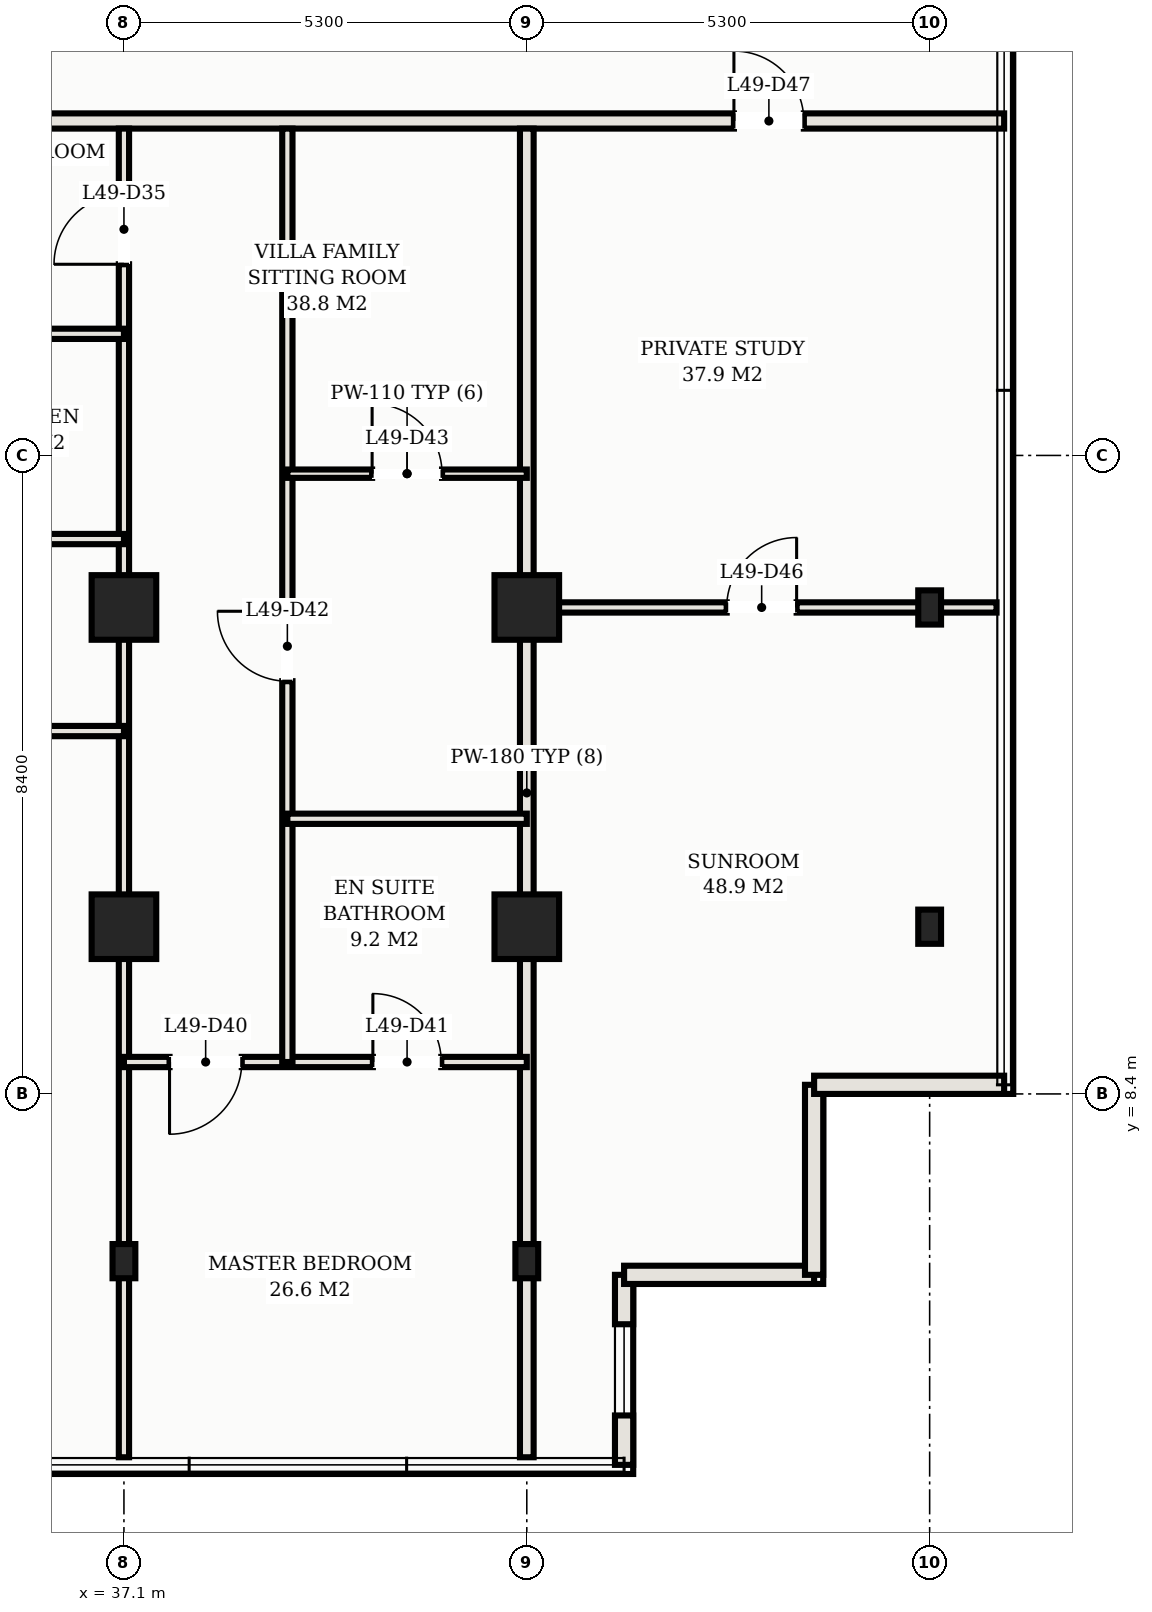
"""IFC4 building model, lengths in metres.
Left out: names, types, materials, properties, quantities, classifications, styles, units other than length and angle.
Written with IfcOpenShell. Run it as: python <this file> out.ifc"""

import sys

from ifc_helpers import new_model, si_unit, direction, frame, frame_2d, origin, origin_2d, place, context, subcontext, project, spatial, rectangle, hollow_rectangle, extrude, element, fill, save


model = new_model("IFC4")
c1 = context("Model", 3, precision=1e-05, world=origin(), true_north=direction((0.0, 1.0)))
c2 = subcontext(c1, "Body", "Model", "MODEL_VIEW")
j1 = project(units=[si_unit("LENGTHUNIT", "METRE"), si_unit("PLANEANGLEUNIT", "RADIAN")], contexts=[c1])
p1 = place(None, origin())
s1 = spatial("IfcSite", under=j1, at=p1, CompositionType="ELEMENT")
p2 = place(p1, origin())
s2 = spatial("IfcBuilding", under=s1, at=p2, CompositionType="ELEMENT")
p3 = place(p2, frame((0.0, 0.0, 178.8)))
s3 = spatial("IfcBuildingStorey", under=s2, at=p3, CompositionType="ELEMENT", Elevation=178.8)
for number, where, z_axis, x_axis in (
    (1, (37.1, 14.8, 0.0), (0.0, 0.0, 1.0), (1.0, 0.0, 0.0)),
    (2, (37.1, 10.6, 0.0), (0.0, 0.0, 1.0), (1.0, 0.0, 0.0)),
    (3, (42.4, 14.8, 0.0), (0.0, 0.0, 1.0), (1.0, 0.0, 0.0)),
    (4, (42.4, 10.6, 0.0), (0.0, 0.0, 1.0), (1.0, 0.0, 0.0)),
):
    element("IfcColumn", number, at=place(p3, frame(where, z_axis=z_axis, x_axis=x_axis)), inside=s3, PredefinedType="COLUMN", context=c2, shape_type="SweptSolid", body=[
        extrude(hollow_rectangle(XDim=0.85, YDim=0.85, WallThickness=0.028, at=origin_2d()), origin(), (0.0, 0.0, 1.0), 3.3),
    ])
for number, where, z_axis, x_axis in (
    (5, (37.1, 6.2, 0.0), (0.0, 0.0, 1.0), (1.0, 0.0, 0.0)),
    (6, (42.4, 6.2, 0.0), (0.0, 0.0, 1.0), (1.0, 0.0, 0.0)),
    (7, (47.7, 10.6, 0.0), (0.0, 0.0, 1.0), (1.0, 0.0, 0.0)),
    (8, (47.7, 14.8, 0.0), (0.0, 0.0, 1.0), (1.0, 0.0, 0.0)),
):
    element("IfcColumn", number, at=place(p3, frame(where, z_axis=z_axis, x_axis=x_axis)), inside=s3, PredefinedType="COLUMN", context=c2, shape_type="SweptSolid", body=[
        extrude(hollow_rectangle(XDim=0.3, YDim=0.45, WallThickness=0.016, at=origin_2d()), origin(), (0.0, 0.0, 1.0), 3.3),
    ])
p4 = place(p3, frame((43.68, 3.52, 0.0), z_axis=(0.0, 0.0, 1.0), x_axis=(0.0, 1.0, 0.0)))
e9 = element("IfcWall", 9, at=p4, inside=s3, PredefinedType="SOLIDWALL", context=c2, shape_type="SweptSolid", body=[
    extrude(rectangle(XDim=2.5, YDim=0.24, at=frame_2d((1.25, 0.0))), origin(), (0.0, 0.0, 1.0), 3.1),
])
p5 = place(p4, frame((0.65, 0.0, 0.75)))
e10 = element("IfcOpeningElement", 10, at=p5, cuts=e9, PredefinedType="OPENING", context=c2, shape_type="SweptSolid", body=[
    extrude(rectangle(XDim=1.2, YDim=1.5, at=frame_2d((0.6, 0.75))), frame((0.0, 0.13, 0.0), z_axis=(0.0, -1.0, 0.0), x_axis=(1.0, 0.0, 0.0)), (0.0, 0.0, 1.0), 0.26),
])
for number, where, z_axis, x_axis in (
    (11, (43.68, 6.02, 0.0), (0.0, 0.0, 1.0), (1.0, 0.0, 0.0)),
    (12, (46.18, 6.02, 0.0), (0.0, 0.0, 1.0), (0.0, 1.0, 0.0)),
    (13, (46.18, 8.52, 0.0), (0.0, 0.0, 1.0), (1.0, 0.0, 0.0)),
):
    element("IfcWall", number, at=place(p3, frame(where, z_axis=z_axis, x_axis=x_axis)), inside=s3, PredefinedType="SOLIDWALL", context=c2, shape_type="SweptSolid", body=[
        extrude(rectangle(XDim=2.5, YDim=0.24, at=frame_2d((1.25, 0.0))), origin(), (0.0, 0.0, 1.0), 3.1),
    ])
p6 = place(p3, frame((4.32, 21.2, 0.0), z_axis=(0.0, 0.0, 1.0), x_axis=(1.0, 0.0, 0.0)))
e14 = element("IfcWall", 14, at=p6, inside=s3, PredefinedType="PARTITIONING", context=c2, shape_type="SweptSolid", body=[
    extrude(rectangle(XDim=44.36, YDim=0.2, at=frame_2d((22.18, 0.0))), origin(), (0.0, 0.0, 1.0), 2.38),
])
p7 = place(p6, frame((7.03, 0.0, 0.0)))
e15 = element("IfcOpeningElement", 15, at=p7, cuts=e14, PredefinedType="OPENING", context=c2, shape_type="SweptSolid", body=[
    extrude(rectangle(XDim=1.1, YDim=2.25, at=frame_2d((0.55, 1.125))), frame((0.0, 0.11, 0.0), z_axis=(0.0, -1.0, 0.0), x_axis=(1.0, 0.0, 0.0)), (0.0, 0.0, 1.0), 0.22),
])
p8 = place(p6, frame((28.23, 0.0, 0.0)))
e16 = element("IfcOpeningElement", 16, at=p8, cuts=e14, PredefinedType="OPENING", context=c2, shape_type="SweptSolid", body=[
    extrude(rectangle(XDim=1.1, YDim=2.25, at=frame_2d((0.55, 1.125))), frame((0.0, 0.11, 0.0), z_axis=(0.0, -1.0, 0.0), x_axis=(1.0, 0.0, 0.0)), (0.0, 0.0, 1.0), 0.22),
])
p9 = place(p6, frame((2.635, 0.0, 0.0)))
e17 = element("IfcOpeningElement", 17, at=p9, cuts=e14, PredefinedType="OPENING", context=c2, shape_type="SweptSolid", body=[
    extrude(rectangle(XDim=0.92, YDim=2.15, at=frame_2d((0.46, 1.075))), frame((0.0, 0.11, 0.0), z_axis=(0.0, -1.0, 0.0), x_axis=(1.0, 0.0, 0.0)), (0.0, 0.0, 1.0), 0.22),
])
p10 = place(p6, frame((40.805, 0.0, 0.0)))
e18 = element("IfcOpeningElement", 18, at=p10, cuts=e14, PredefinedType="OPENING", context=c2, shape_type="SweptSolid", body=[
    extrude(rectangle(XDim=0.92, YDim=2.15, at=frame_2d((0.46, 1.075))), frame((0.0, 0.11, 0.0), z_axis=(0.0, -1.0, 0.0), x_axis=(1.0, 0.0, 0.0)), (0.0, 0.0, 1.0), 0.22),
])
p11 = place(p3, frame((42.4, 3.62, 0.0), z_axis=(0.0, 0.0, 1.0), x_axis=(0.0, 1.0, 0.0)))
e19 = element("IfcWall", 19, at=p11, inside=s3, PredefinedType="PARTITIONING", context=c2, shape_type="SweptSolid", body=[
    extrude(rectangle(XDim=17.48, YDim=0.18, at=frame_2d((8.74, 0.0))), origin(), (0.0, 0.0, 1.0), 2.38),
])
p12 = place(p3, frame((37.1, 3.62, 0.0), z_axis=(0.0, 0.0, 1.0), x_axis=(0.0, 1.0, 0.0)))
e20 = element("IfcWall", 20, at=p12, inside=s3, PredefinedType="PARTITIONING", context=c2, shape_type="SweptSolid", body=[
    extrude(rectangle(XDim=17.48, YDim=0.135, at=frame_2d((8.74, 0.0))), origin(), (0.0, 0.0, 1.0), 2.38),
])
p13 = place(p12, frame((15.695, 0.0, 0.0)))
e21 = element("IfcOpeningElement", 21, at=p13, cuts=e20, PredefinedType="OPENING", context=c2, shape_type="SweptSolid", body=[
    extrude(rectangle(XDim=0.92, YDim=2.15, at=frame_2d((0.46, 1.075))), frame((0.0, 0.078, 0.0), z_axis=(0.0, -1.0, 0.0), x_axis=(1.0, 0.0, 0.0)), (0.0, 0.0, 1.0), 0.155),
])
p14 = place(p3, frame((31.8, 13.174, 0.0), z_axis=(0.0, 0.0, 1.0), x_axis=(1.0, 0.0, 0.0)))
e22 = element("IfcWall", 22, at=p14, inside=s3, PredefinedType="PARTITIONING", context=c2, shape_type="SweptSolid", body=[
    extrude(rectangle(XDim=5.3, YDim=0.135, at=frame_2d((2.65, 0.0))), origin(), (0.0, 0.0, 1.0), 2.38),
])
p15 = place(p14, frame((0.615, 0.0, 0.0)))
e23 = element("IfcOpeningElement", 23, at=p15, cuts=e22, PredefinedType="OPENING", context=c2, shape_type="SweptSolid", body=[
    extrude(rectangle(XDim=0.92, YDim=2.15, at=frame_2d((0.46, 1.075))), frame((0.0, 0.078, 0.0), z_axis=(0.0, -1.0, 0.0), x_axis=(1.0, 0.0, 0.0)), (0.0, 0.0, 1.0), 0.155),
])
for number, where, z_axis, x_axis in (
    (24, (33.95, 15.7, 0.0), (0.0, 0.0, 1.0), (1.0, 0.0, 0.0)),
    (25, (33.95, 18.4, 0.0), (0.0, 0.0, 1.0), (1.0, 0.0, 0.0)),
):
    element("IfcWall", number, at=place(p3, frame(where, z_axis=z_axis, x_axis=x_axis)), inside=s3, PredefinedType="PARTITIONING", context=c2, shape_type="SweptSolid", body=[
        extrude(rectangle(XDim=3.15, YDim=0.135, at=frame_2d((1.575, 0.0))), origin(), (0.0, 0.0, 1.0), 2.38),
    ])
p16 = place(p3, frame((37.1, 8.82, 0.0), z_axis=(0.0, 0.0, 1.0), x_axis=(1.0, 0.0, 0.0)))
e26 = element("IfcWall", 26, at=p16, inside=s3, PredefinedType="PARTITIONING", context=c2, shape_type="SweptSolid", body=[
    extrude(rectangle(XDim=5.3, YDim=0.135, at=frame_2d((2.65, 0.0))), origin(), (0.0, 0.0, 1.0), 2.38),
])
p17 = place(p16, frame((0.6, 0.0, 0.0)))
e27 = element("IfcOpeningElement", 27, at=p17, cuts=e26, PredefinedType="OPENING", context=c2, shape_type="SweptSolid", body=[
    extrude(rectangle(XDim=0.95, YDim=2.15, at=frame_2d((0.475, 1.075))), frame((0.0, 0.078, 0.0), z_axis=(0.0, -1.0, 0.0), x_axis=(1.0, 0.0, 0.0)), (0.0, 0.0, 1.0), 0.155),
])
p18 = place(p16, frame((3.275, 0.0, 0.0)))
e28 = element("IfcOpeningElement", 28, at=p18, cuts=e26, PredefinedType="OPENING", context=c2, shape_type="SweptSolid", body=[
    extrude(rectangle(XDim=0.9, YDim=2.15, at=frame_2d((0.45, 1.075))), frame((0.0, 0.078, 0.0), z_axis=(0.0, -1.0, 0.0), x_axis=(1.0, 0.0, 0.0)), (0.0, 0.0, 1.0), 0.155),
])
p19 = place(p3, frame((39.25, 8.82, 0.0), z_axis=(0.0, 0.0, 1.0), x_axis=(0.0, 1.0, 0.0)))
e29 = element("IfcWall", 29, at=p19, inside=s3, PredefinedType="PARTITIONING", context=c2, shape_type="SweptSolid", body=[
    extrude(rectangle(XDim=12.28, YDim=0.135, at=frame_2d((6.14, 0.0))), origin(), (0.0, 0.0, 1.0), 2.38),
])
p20 = place(p19, frame((5.01, 0.0, 0.0)))
e30 = element("IfcOpeningElement", 30, at=p20, cuts=e29, PredefinedType="OPENING", context=c2, shape_type="SweptSolid", body=[
    extrude(rectangle(XDim=0.92, YDim=2.15, at=frame_2d((0.46, 1.075))), frame((0.0, 0.078, 0.0), z_axis=(0.0, -1.0, 0.0), x_axis=(1.0, 0.0, 0.0)), (0.0, 0.0, 1.0), 0.155),
])
p21 = place(p3, frame((39.25, 12.02, 0.0), z_axis=(0.0, 0.0, 1.0), x_axis=(1.0, 0.0, 0.0)))
e31 = element("IfcWall", 31, at=p21, inside=s3, PredefinedType="PARTITIONING", context=c2, shape_type="SweptSolid", body=[
    extrude(rectangle(XDim=3.15, YDim=0.135, at=frame_2d((1.575, 0.0))), origin(), (0.0, 0.0, 1.0), 2.38),
])
p22 = place(p3, frame((39.25, 16.56, 0.0), z_axis=(0.0, 0.0, 1.0), x_axis=(1.0, 0.0, 0.0)))
e32 = element("IfcWall", 32, at=p22, inside=s3, PredefinedType="MOVABLE", context=c2, shape_type="SweptSolid", body=[
    extrude(rectangle(XDim=3.15, YDim=0.11, at=frame_2d((1.575, 0.0))), origin(), (0.0, 0.0, 1.0), 2.38),
])
p23 = place(p22, frame((1.115, 0.0, 0.0)))
e33 = element("IfcOpeningElement", 33, at=p23, cuts=e32, PredefinedType="OPENING", context=c2, shape_type="SweptSolid", body=[
    extrude(rectangle(XDim=0.92, YDim=2.15, at=frame_2d((0.46, 1.075))), frame((0.0, 0.065, 0.0), z_axis=(0.0, -1.0, 0.0), x_axis=(1.0, 0.0, 0.0)), (0.0, 0.0, 1.0), 0.13),
])
p24 = place(p3, frame((42.4, 14.8, 0.0), z_axis=(0.0, 0.0, 1.0), x_axis=(1.0, 0.0, 0.0)))
e34 = element("IfcWall", 34, at=p24, inside=s3, PredefinedType="PARTITIONING", context=c2, shape_type="SweptSolid", body=[
    extrude(rectangle(XDim=6.18, YDim=0.135, at=frame_2d((3.09, 0.0))), origin(), (0.0, 0.0, 1.0), 2.38),
])
p25 = place(p24, frame((2.63, 0.0, 0.0)))
e35 = element("IfcOpeningElement", 35, at=p25, cuts=e34, PredefinedType="OPENING", context=c2, shape_type="SweptSolid", body=[
    extrude(rectangle(XDim=0.92, YDim=2.15, at=frame_2d((0.46, 1.075))), frame((0.0, 0.078, 0.0), z_axis=(0.0, -1.0, 0.0), x_axis=(1.0, 0.0, 0.0)), (0.0, 0.0, 1.0), 0.155),
])
p26 = place(p5, origin())
e36 = element("IfcWindow", 36, at=p26, inside=s3, PartitioningType="SINGLE_PANEL", PredefinedType="WINDOW", context=c2, shape_type="SweptSolid", body=[
    extrude(rectangle(XDim=1.2, YDim=1.5, at=frame_2d((0.6, 0.75))), frame((0.0, 0.03, 0.0), z_axis=(0.0, -1.0, 0.0), x_axis=(1.0, 0.0, 0.0)), (0.0, 0.0, 1.0), 0.06),
])
fill(e10, e36)
p27 = place(p13, origin())
e37 = element("IfcDoor", 37, at=p27, inside=s3, OperationType="SINGLE_SWING_LEFT", PredefinedType="DOOR", context=c2, shape_type="SweptSolid", body=[
    extrude(rectangle(XDim=0.92, YDim=2.15, at=frame_2d((0.46, 1.075))), frame((0.0, 0.025, 0.0), z_axis=(0.0, -1.0, 0.0), x_axis=(1.0, 0.0, 0.0)), (0.0, 0.0, 1.0), 0.05),
])
fill(e21, e37)
p28 = place(p17, frame((0.95, 0.0, 0.0), z_axis=(0.0, 0.0, 1.0), x_axis=(-1.0, 0.0, 0.0)))
e38 = element("IfcDoor", 38, at=p28, inside=s3, OperationType="SINGLE_SWING_RIGHT", PredefinedType="DOOR", context=c2, shape_type="SweptSolid", body=[
    extrude(rectangle(XDim=0.95, YDim=2.15, at=frame_2d((0.475, 1.075))), frame((0.0, 0.025, 0.0), z_axis=(0.0, -1.0, 0.0), x_axis=(1.0, 0.0, 0.0)), (0.0, 0.0, 1.0), 0.05),
])
fill(e27, e38)
p29 = place(p18, origin())
e39 = element("IfcDoor", 39, at=p29, inside=s3, OperationType="SINGLE_SWING_LEFT", PredefinedType="DOOR", context=c2, shape_type="SweptSolid", body=[
    extrude(rectangle(XDim=0.9, YDim=2.15, at=frame_2d((0.45, 1.075))), frame((0.0, 0.025, 0.0), z_axis=(0.0, -1.0, 0.0), x_axis=(1.0, 0.0, 0.0)), (0.0, 0.0, 1.0), 0.05),
])
fill(e28, e39)
p30 = place(p20, origin())
e40 = element("IfcDoor", 40, at=p30, inside=s3, OperationType="SINGLE_SWING_RIGHT", PredefinedType="DOOR", context=c2, shape_type="SweptSolid", body=[
    extrude(rectangle(XDim=0.92, YDim=2.15, at=frame_2d((0.46, 1.075))), frame((0.0, 0.025, 0.0), z_axis=(0.0, -1.0, 0.0), x_axis=(1.0, 0.0, 0.0)), (0.0, 0.0, 1.0), 0.05),
])
fill(e30, e40)
p31 = place(p23, origin())
e41 = element("IfcDoor", 41, at=p31, inside=s3, OperationType="SINGLE_SWING_LEFT", PredefinedType="DOOR", context=c2, shape_type="SweptSolid", body=[
    extrude(rectangle(XDim=0.92, YDim=2.15, at=frame_2d((0.46, 1.075))), frame((0.0, 0.025, 0.0), z_axis=(0.0, -1.0, 0.0), x_axis=(1.0, 0.0, 0.0)), (0.0, 0.0, 1.0), 0.05),
])
fill(e33, e41)
p32 = place(p25, origin())
e42 = element("IfcDoor", 42, at=p32, inside=s3, OperationType="SINGLE_SWING_RIGHT", PredefinedType="DOOR", context=c2, shape_type="SweptSolid", body=[
    extrude(rectangle(XDim=0.92, YDim=2.15, at=frame_2d((0.46, 1.075))), frame((0.0, 0.025, 0.0), z_axis=(0.0, -1.0, 0.0), x_axis=(1.0, 0.0, 0.0)), (0.0, 0.0, 1.0), 0.05),
])
fill(e35, e42)
p33 = place(p10, origin())
e43 = element("IfcDoor", 43, at=p33, inside=s3, OperationType="SINGLE_SWING_LEFT", PredefinedType="DOOR", context=c2, shape_type="SweptSolid", body=[
    extrude(rectangle(XDim=0.92, YDim=2.15, at=frame_2d((0.46, 1.075))), frame((0.0, 0.025, 0.0), z_axis=(0.0, -1.0, 0.0), x_axis=(1.0, 0.0, 0.0)), (0.0, 0.0, 1.0), 0.05),
])
fill(e18, e43)
save(model, sys.argv[1])
